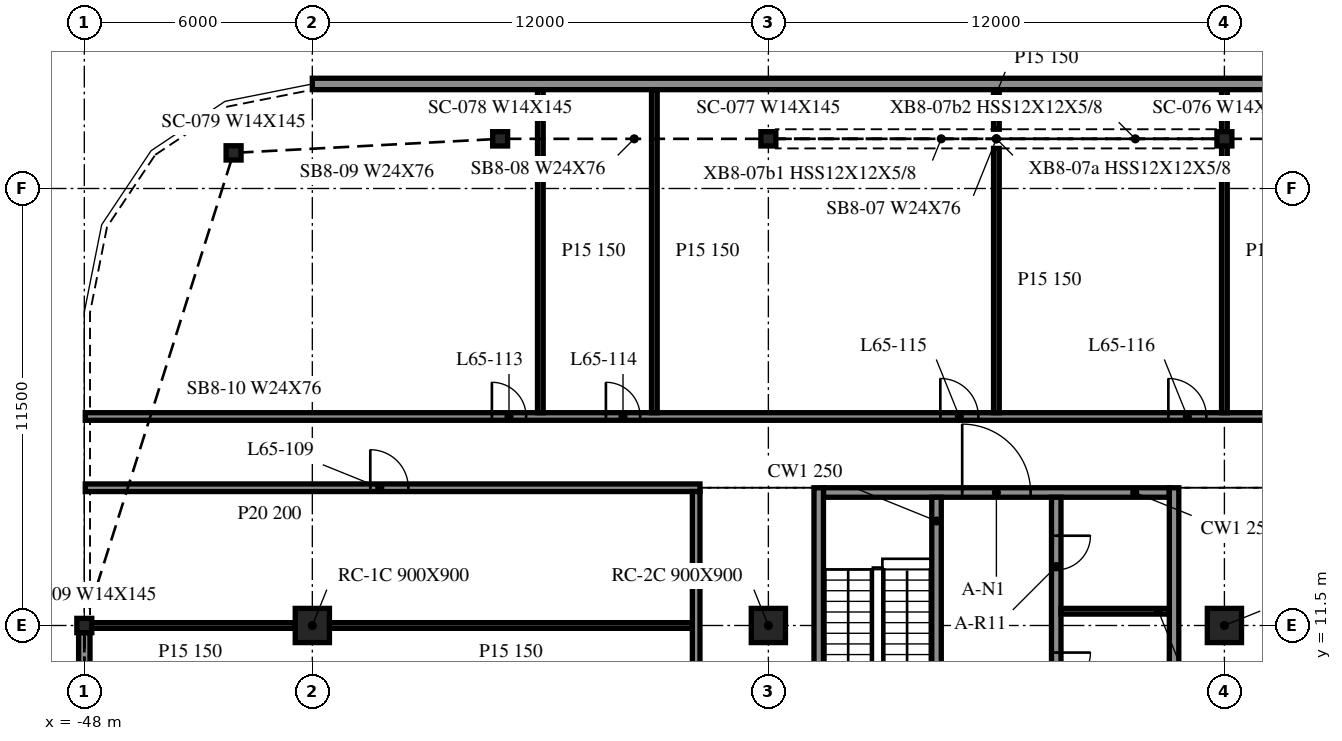
"""IFC4 building model, lengths in metres.
Left out: names, types, materials, properties, quantities, classifications, styles, units other than length and angle.
Written with IfcOpenShell. Run it as: python <this file> out.ifc"""

import sys

from ifc_helpers import new_model, si_unit, direction, frame, frame_2d, origin, origin_2d, place, context, subcontext, project, spatial, rectangle, i_section, extrude, element, fill, save


model = new_model("IFC4")
c1 = context("Model", 3, precision=1e-05, world=origin(), true_north=direction((0.0, 1.0)))
c2 = subcontext(c1, "Body", "Model", "MODEL_VIEW")
j1 = project(units=[si_unit("LENGTHUNIT", "METRE"), si_unit("PLANEANGLEUNIT", "RADIAN")], contexts=[c1])
p1 = place(None, origin())
s1 = spatial("IfcSite", under=j1, at=p1, CompositionType="ELEMENT")
p2 = place(p1, origin())
s2 = spatial("IfcBuilding", under=s1, at=p2, CompositionType="ELEMENT")
p3 = place(p2, frame((0.0, 0.0, 267.1)))
s3 = spatial("IfcBuildingStorey", under=s2, at=p3, CompositionType="ELEMENT", Elevation=267.1)
for number, where, z_axis, x_axis in (
    (1, (-42.0, 11.5, -0.34), (0.0, 0.0, 1.0), (1.0, 0.0, 0.0)),
    (2, (-30.0, 11.5, -0.34), (0.0, 0.0, 1.0), (1.0, 0.0, 0.0)),
    (3, (-18.0, 11.5, -0.34), (0.0, 0.0, 1.0), (1.0, 0.0, 0.0)),
):
    element("IfcColumn", number, at=place(p3, frame(where, z_axis=z_axis, x_axis=x_axis)), inside=s3, PredefinedType="COLUMN", context=c2, shape_type="SweptSolid", body=[
        extrude(rectangle(XDim=0.9, YDim=0.9, at=origin_2d()), origin(), (0.0, 0.0, 1.0), 3.8),
    ])
for number, where, z_axis, x_axis in (
    (4, (-18.0, 24.307, -0.34), (0.0, 0.0, 1.0), (1.0, 0.0, 0.0)),
    (5, (-30.0, 24.307, -0.34), (0.0, 0.0, 1.0), (1.0, 0.0, 0.0)),
    (6, (-37.058, 24.307, -0.34), (0.0, 0.0, 1.0), (1.0, 0.0, 0.0)),
    (7, (-44.072, 23.937, -0.34), (0.0, 0.0, 1.0), (1.0, 0.0, 0.0)),
    (8, (-48.0, 11.5, -0.34), (0.0, 0.0, 1.0), (1.0, 0.0, 0.0)),
):
    element("IfcColumn", number, at=place(p3, frame(where, z_axis=z_axis, x_axis=x_axis)), inside=s3, PredefinedType="COLUMN", context=c2, shape_type="SweptSolid", body=[
        extrude(i_section(OverallWidth=0.394, OverallDepth=0.376, WebThickness=0.017, FlangeThickness=0.028, at=origin_2d()), origin(), (0.0, 0.0, 1.0), 3.8),
    ])
p4 = place(p3, frame((42.0, 25.751, 0.0), z_axis=(0.0, 0.0, 1.0), x_axis=(-1.0, 0.0, 0.0)))
e9 = element("IfcWall", 9, at=p4, inside=s3, PredefinedType="NOTDEFINED", context=c2, shape_type="SweptSolid", body=[
    extrude(rectangle(XDim=84.0, YDim=0.3, at=frame_2d((42.0, 0.0))), origin(), (0.0, 0.0, 1.0), 2.853),
])
p5 = place(p3, frame((-48.0, 11.312, 0.0), z_axis=(0.0, 0.0, 1.0), x_axis=(0.0, -1.0, 0.0)))
e10 = element("IfcWall", 10, at=p5, inside=s3, PredefinedType="NOTDEFINED", context=c2, shape_type="SweptSolid", body=[
    extrude(rectangle(XDim=11.124, YDim=0.3, at=frame_2d((5.562, 0.0))), origin(), (0.0, 0.0, 1.0), 2.853),
])
for number, where, z_axis, x_axis in (
    (11, (-28.675, 15.125, 0.0), (0.0, 0.0, 1.0), (0.0, -1.0, 0.0)),
    (12, (-19.325, -9.125, 0.0), (0.0, 0.0, 1.0), (0.0, 1.0, 0.0)),
):
    element("IfcWall", number, at=place(p3, frame(where, z_axis=z_axis, x_axis=x_axis)), inside=s3, PredefinedType="SOLIDWALL", context=c2, shape_type="SweptSolid", body=[
        extrude(rectangle(XDim=24.25, YDim=0.25, at=frame_2d((12.125, 0.0))), origin(), (0.0, 0.0, 1.0), 3.46),
    ])
p6 = place(p3, frame((-28.55, 15.0, 0.0), z_axis=(0.0, 0.0, 1.0), x_axis=(1.0, 0.0, 0.0)))
e13 = element("IfcWall", 13, at=p6, inside=s3, PredefinedType="SOLIDWALL", context=c2, shape_type="SweptSolid", body=[
    extrude(rectangle(XDim=9.1, YDim=0.25, at=frame_2d((4.55, 0.0))), origin(), (0.0, 0.0, 1.0), 3.46),
])
p7 = place(p6, frame((3.65, 0.0, 0.0)))
e14 = element("IfcOpeningElement", 14, at=p7, cuts=e13, PredefinedType="OPENING", context=c2, shape_type="SweptSolid", body=[
    extrude(rectangle(XDim=1.8, YDim=2.1, at=frame_2d((0.9, 1.05))), frame((0.0, 0.135, 0.0), z_axis=(0.0, -1.0, 0.0), x_axis=(1.0, 0.0, 0.0)), (0.0, 0.0, 1.0), 0.27),
])
p8 = place(p3, frame((-25.575, 14.875, 0.0), z_axis=(0.0, 0.0, 1.0), x_axis=(0.0, -1.0, 0.0)))
e15 = element("IfcWall", 15, at=p8, inside=s3, PredefinedType="SOLIDWALL", context=c2, shape_type="SweptSolid", body=[
    extrude(rectangle(XDim=6.25, YDim=0.25, at=frame_2d((3.125, 0.0))), origin(), (0.0, 0.0, 1.0), 3.46),
])
p9 = place(p8, frame((4.85, 0.0, 0.0)))
e16 = element("IfcOpeningElement", 16, at=p9, cuts=e15, PredefinedType="OPENING", context=c2, shape_type="SweptSolid", body=[
    extrude(rectangle(XDim=1.0, YDim=2.1, at=frame_2d((0.5, 1.05))), frame((0.0, 0.135, 0.0), z_axis=(0.0, -1.0, 0.0), x_axis=(1.0, 0.0, 0.0)), (0.0, 0.0, 1.0), 0.27),
])
p10 = place(p3, frame((-22.425, 14.875, 0.0), z_axis=(0.0, 0.0, 1.0), x_axis=(0.0, -1.0, 0.0)))
e17 = element("IfcWall", 17, at=p10, inside=s3, PredefinedType="SOLIDWALL", context=c2, shape_type="SweptSolid", body=[
    extrude(rectangle(XDim=23.75, YDim=0.25, at=frame_2d((11.875, 0.0))), origin(), (0.0, 0.0, 1.0), 3.46),
])
p11 = place(p10, frame((13.075, 0.0, 0.0)))
e18 = element("IfcOpeningElement", 18, at=p11, cuts=e17, PredefinedType="OPENING", context=c2, shape_type="SweptSolid", body=[
    extrude(rectangle(XDim=0.9, YDim=2.1, at=frame_2d((0.45, 1.05))), frame((0.0, 0.135, 0.0), z_axis=(0.0, -1.0, 0.0), x_axis=(1.0, 0.0, 0.0)), (0.0, 0.0, 1.0), 0.27),
])
p12 = place(p10, frame((7.625, 0.0, 0.0)))
e19 = element("IfcOpeningElement", 19, at=p12, cuts=e17, PredefinedType="OPENING", context=c2, shape_type="SweptSolid", body=[
    extrude(rectangle(XDim=0.9, YDim=2.1, at=frame_2d((0.45, 1.05))), frame((0.0, 0.135, 0.0), z_axis=(0.0, -1.0, 0.0), x_axis=(1.0, 0.0, 0.0)), (0.0, 0.0, 1.0), 0.27),
])
p13 = place(p10, frame((21.597, 0.0, 0.0)))
e20 = element("IfcOpeningElement", 20, at=p13, cuts=e17, PredefinedType="OPENING", context=c2, shape_type="SweptSolid", body=[
    extrude(rectangle(XDim=0.9, YDim=2.1, at=frame_2d((0.45, 1.05))), frame((0.0, 0.135, 0.0), z_axis=(0.0, -1.0, 0.0), x_axis=(1.0, 0.0, 0.0)), (0.0, 0.0, 1.0), 0.27),
])
p14 = place(p10, frame((18.522, 0.0, 0.0)))
e21 = element("IfcOpeningElement", 21, at=p14, cuts=e17, PredefinedType="OPENING", context=c2, shape_type="SweptSolid", body=[
    extrude(rectangle(XDim=0.9, YDim=2.1, at=frame_2d((0.45, 1.05))), frame((0.0, 0.135, 0.0), z_axis=(0.0, -1.0, 0.0), x_axis=(1.0, 0.0, 0.0)), (0.0, 0.0, 1.0), 0.27),
])
p15 = place(p10, frame((4.087, 0.0, 0.0)))
e22 = element("IfcOpeningElement", 22, at=p15, cuts=e17, PredefinedType="OPENING", context=c2, shape_type="SweptSolid", body=[
    extrude(rectangle(XDim=0.9, YDim=2.1, at=frame_2d((0.45, 1.05))), frame((0.0, 0.135, 0.0), z_axis=(0.0, -1.0, 0.0), x_axis=(1.0, 0.0, 0.0)), (0.0, 0.0, 1.0), 0.27),
])
p16 = place(p10, frame((1.012, 0.0, 0.0)))
e23 = element("IfcOpeningElement", 23, at=p16, cuts=e17, PredefinedType="OPENING", context=c2, shape_type="SweptSolid", body=[
    extrude(rectangle(XDim=0.9, YDim=2.1, at=frame_2d((0.45, 1.05))), frame((0.0, 0.135, 0.0), z_axis=(0.0, -1.0, 0.0), x_axis=(1.0, 0.0, 0.0)), (0.0, 0.0, 1.0), 0.27),
])
p17 = place(p3, frame((-22.3, 11.875, 0.0), z_axis=(0.0, 0.0, 1.0), x_axis=(1.0, 0.0, 0.0)))
e24 = element("IfcWall", 24, at=p17, inside=s3, PredefinedType="PARTITIONING", context=c2, shape_type="SweptSolid", body=[
    extrude(rectangle(XDim=2.85, YDim=0.15, at=frame_2d((1.425, 0.0))), origin(), (0.0, 0.0, 1.0), 3.46),
])
p18 = place(p3, frame((-47.975, 11.5, 0.0), z_axis=(0.0, 0.0, 1.0), x_axis=(1.0, 0.0, 0.0)))
e25 = element("IfcWall", 25, at=p18, inside=s3, PredefinedType="PARTITIONING", context=c2, shape_type="SweptSolid", body=[
    extrude(rectangle(XDim=5.525, YDim=0.15, at=frame_2d((2.763, 0.0))), origin(), (0.0, 0.0, 1.0), 3.46),
])
p19 = place(p3, frame((-41.55, 11.5, 0.0), z_axis=(0.0, 0.0, 1.0), x_axis=(1.0, 0.0, 0.0)))
e26 = element("IfcWall", 26, at=p19, inside=s3, PredefinedType="PARTITIONING", context=c2, shape_type="SweptSolid", body=[
    extrude(rectangle(XDim=9.55, YDim=0.15, at=frame_2d((4.775, 0.0))), origin(), (0.0, 0.0, 1.0), 3.46),
])
p20 = place(p3, frame((-47.975, 15.125, 0.0), z_axis=(0.0, 0.0, 1.0), x_axis=(1.0, 0.0, 0.0)))
e27 = element("IfcWall", 27, at=p20, inside=s3, PredefinedType="PARTITIONING", context=c2, shape_type="SweptSolid", body=[
    extrude(rectangle(XDim=16.175, YDim=0.2, at=frame_2d((8.087, 0.0))), origin(), (0.0, 0.0, 1.0), 3.46),
])
p21 = place(p20, frame((7.5, 0.0, 0.0)))
e28 = element("IfcOpeningElement", 28, at=p21, cuts=e27, PredefinedType="OPENING", context=c2, shape_type="SweptSolid", body=[
    extrude(rectangle(XDim=1.0, YDim=2.1, at=frame_2d((0.5, 1.05))), frame((0.0, 0.11, 0.0), z_axis=(0.0, -1.0, 0.0), x_axis=(1.0, 0.0, 0.0)), (0.0, 0.0, 1.0), 0.22),
])
p22 = place(p3, frame((-47.975, 17.0, 0.0), z_axis=(0.0, 0.0, 1.0), x_axis=(1.0, 0.0, 0.0)))
e29 = element("IfcWall", 29, at=p22, inside=s3, PredefinedType="PARTITIONING", context=c2, shape_type="SweptSolid", body=[
    extrude(rectangle(XDim=95.95, YDim=0.2, at=frame_2d((47.975, 0.0))), origin(), (0.0, 0.0, 1.0), 3.46),
])
p23 = place(p22, frame((10.7, 0.0, 0.0)))
e30 = element("IfcOpeningElement", 30, at=p23, cuts=e29, PredefinedType="OPENING", context=c2, shape_type="SweptSolid", body=[
    extrude(rectangle(XDim=0.9, YDim=2.1, at=frame_2d((0.45, 1.05))), frame((0.0, 0.11, 0.0), z_axis=(0.0, -1.0, 0.0), x_axis=(1.0, 0.0, 0.0)), (0.0, 0.0, 1.0), 0.22),
])
p24 = place(p22, frame((13.7, 0.0, 0.0)))
e31 = element("IfcOpeningElement", 31, at=p24, cuts=e29, PredefinedType="OPENING", context=c2, shape_type="SweptSolid", body=[
    extrude(rectangle(XDim=0.9, YDim=2.1, at=frame_2d((0.45, 1.05))), frame((0.0, 0.11, 0.0), z_axis=(0.0, -1.0, 0.0), x_axis=(1.0, 0.0, 0.0)), (0.0, 0.0, 1.0), 0.22),
])
p25 = place(p22, frame((22.5, 0.0, 0.0)))
e32 = element("IfcOpeningElement", 32, at=p25, cuts=e29, PredefinedType="OPENING", context=c2, shape_type="SweptSolid", body=[
    extrude(rectangle(XDim=1.0, YDim=2.1, at=frame_2d((0.5, 1.05))), frame((0.0, 0.11, 0.0), z_axis=(0.0, -1.0, 0.0), x_axis=(1.0, 0.0, 0.0)), (0.0, 0.0, 1.0), 0.22),
])
p26 = place(p22, frame((28.5, 0.0, 0.0)))
e33 = element("IfcOpeningElement", 33, at=p26, cuts=e29, PredefinedType="OPENING", context=c2, shape_type="SweptSolid", body=[
    extrude(rectangle(XDim=1.0, YDim=2.1, at=frame_2d((0.5, 1.05))), frame((0.0, 0.11, 0.0), z_axis=(0.0, -1.0, 0.0), x_axis=(1.0, 0.0, 0.0)), (0.0, 0.0, 1.0), 0.22),
])
p27 = place(p22, frame((40.7, 0.0, 0.0)))
e34 = element("IfcOpeningElement", 34, at=p27, cuts=e29, PredefinedType="OPENING", context=c2, shape_type="SweptSolid", body=[
    extrude(rectangle(XDim=0.9, YDim=2.1, at=frame_2d((0.45, 1.05))), frame((0.0, 0.11, 0.0), z_axis=(0.0, -1.0, 0.0), x_axis=(1.0, 0.0, 0.0)), (0.0, 0.0, 1.0), 0.22),
])
p28 = place(p22, frame((43.5, 0.0, 0.0)))
e35 = element("IfcOpeningElement", 35, at=p28, cuts=e29, PredefinedType="OPENING", context=c2, shape_type="SweptSolid", body=[
    extrude(rectangle(XDim=1.0, YDim=2.1, at=frame_2d((0.5, 1.05))), frame((0.0, 0.11, 0.0), z_axis=(0.0, -1.0, 0.0), x_axis=(1.0, 0.0, 0.0)), (0.0, 0.0, 1.0), 0.22),
])
p29 = place(p22, frame((47.3, 0.0, 0.0)))
e36 = element("IfcOpeningElement", 36, at=p29, cuts=e29, PredefinedType="OPENING", context=c2, shape_type="SweptSolid", body=[
    extrude(rectangle(XDim=0.9, YDim=2.1, at=frame_2d((0.45, 1.05))), frame((0.0, 0.11, 0.0), z_axis=(0.0, -1.0, 0.0), x_axis=(1.0, 0.0, 0.0)), (0.0, 0.0, 1.0), 0.22),
])
p30 = place(p22, frame((54.1, 0.0, 0.0)))
e37 = element("IfcOpeningElement", 37, at=p30, cuts=e29, PredefinedType="OPENING", context=c2, shape_type="SweptSolid", body=[
    extrude(rectangle(XDim=0.9, YDim=2.1, at=frame_2d((0.45, 1.05))), frame((0.0, 0.11, 0.0), z_axis=(0.0, -1.0, 0.0), x_axis=(1.0, 0.0, 0.0)), (0.0, 0.0, 1.0), 0.22),
])
p31 = place(p22, frame((60.1, 0.0, 0.0)))
e38 = element("IfcOpeningElement", 38, at=p31, cuts=e29, PredefinedType="OPENING", context=c2, shape_type="SweptSolid", body=[
    extrude(rectangle(XDim=1.0, YDim=2.1, at=frame_2d((0.5, 1.05))), frame((0.0, 0.11, 0.0), z_axis=(0.0, -1.0, 0.0), x_axis=(1.0, 0.0, 0.0)), (0.0, 0.0, 1.0), 0.22),
])
p32 = place(p22, frame((72.1, 0.0, 0.0)))
e39 = element("IfcOpeningElement", 39, at=p32, cuts=e29, PredefinedType="OPENING", context=c2, shape_type="SweptSolid", body=[
    extrude(rectangle(XDim=1.0, YDim=2.1, at=frame_2d((0.5, 1.05))), frame((0.0, 0.11, 0.0), z_axis=(0.0, -1.0, 0.0), x_axis=(1.0, 0.0, 0.0)), (0.0, 0.0, 1.0), 0.22),
])
p33 = place(p22, frame((75.1, 0.0, 0.0)))
e40 = element("IfcOpeningElement", 40, at=p33, cuts=e29, PredefinedType="OPENING", context=c2, shape_type="SweptSolid", body=[
    extrude(rectangle(XDim=0.9, YDim=2.1, at=frame_2d((0.45, 1.05))), frame((0.0, 0.11, 0.0), z_axis=(0.0, -1.0, 0.0), x_axis=(1.0, 0.0, 0.0)), (0.0, 0.0, 1.0), 0.22),
])
p34 = place(p22, frame((84.1, 0.0, 0.0)))
e41 = element("IfcOpeningElement", 41, at=p34, cuts=e29, PredefinedType="OPENING", context=c2, shape_type="SweptSolid", body=[
    extrude(rectangle(XDim=1.0, YDim=2.1, at=frame_2d((0.5, 1.05))), frame((0.0, 0.11, 0.0), z_axis=(0.0, -1.0, 0.0), x_axis=(1.0, 0.0, 0.0)), (0.0, 0.0, 1.0), 0.22),
])
p35 = place(p22, frame((90.1, 0.0, 0.0)))
e42 = element("IfcOpeningElement", 42, at=p35, cuts=e29, PredefinedType="OPENING", context=c2, shape_type="SweptSolid", body=[
    extrude(rectangle(XDim=0.9, YDim=2.1, at=frame_2d((0.45, 1.05))), frame((0.0, 0.11, 0.0), z_axis=(0.0, -1.0, 0.0), x_axis=(1.0, 0.0, 0.0)), (0.0, 0.0, 1.0), 0.22),
])
for number, where, z_axis, x_axis in (
    (43, (-36.0, 17.1, 0.0), (0.0, 0.0, 1.0), (0.0, 1.0, 0.0)),
    (44, (-33.0, 17.1, 0.0), (0.0, 0.0, 1.0), (0.0, 1.0, 0.0)),
):
    element("IfcWall", number, at=place(p3, frame(where, z_axis=z_axis, x_axis=x_axis)), inside=s3, PredefinedType="PARTITIONING", context=c2, shape_type="SweptSolid", body=[
        extrude(rectangle(XDim=8.501, YDim=0.15, at=frame_2d((4.25, 0.0))), origin(), (0.0, 0.0, 1.0), 3.46),
    ])
p36 = place(p3, frame((-31.9, -9.025, 0.0), z_axis=(0.0, 0.0, 1.0), x_axis=(0.0, 1.0, 0.0)))
e45 = element("IfcWall", 45, at=p36, inside=s3, PredefinedType="PARTITIONING", context=c2, shape_type="SweptSolid", body=[
    extrude(rectangle(XDim=24.05, YDim=0.2, at=frame_2d((12.025, 0.0))), origin(), (0.0, 0.0, 1.0), 3.46),
])
p37 = place(p36, frame((12.3, 0.0, 0.0)))
e46 = element("IfcOpeningElement", 46, at=p37, cuts=e45, PredefinedType="OPENING", context=c2, shape_type="SweptSolid", body=[
    extrude(rectangle(XDim=1.0, YDim=2.1, at=frame_2d((0.5, 1.05))), frame((0.0, 0.11, 0.0), z_axis=(0.0, -1.0, 0.0), x_axis=(1.0, 0.0, 0.0)), (0.0, 0.0, 1.0), 0.22),
])
p38 = place(p3, frame((-24.0, 17.1, 0.0), z_axis=(0.0, 0.0, 1.0), x_axis=(0.0, 1.0, 0.0)))
e47 = element("IfcWall", 47, at=p38, inside=s3, PredefinedType="PARTITIONING", context=c2, shape_type="SweptSolid", body=[
    extrude(rectangle(XDim=6.955, YDim=0.15, at=frame_2d((3.477, 0.0))), origin(), (0.0, 0.0, 1.0), 3.46),
])
p39 = place(p3, frame((-24.0, 24.559, 0.0), z_axis=(0.0, 0.0, 1.0), x_axis=(0.0, 1.0, 0.0)))
e48 = element("IfcWall", 48, at=p39, inside=s3, PredefinedType="PARTITIONING", context=c2, shape_type="SweptSolid", body=[
    extrude(rectangle(XDim=1.042, YDim=0.15, at=frame_2d((0.521, 0.0))), origin(), (0.0, 0.0, 1.0), 3.46),
])
p40 = place(p3, frame((-18.0, 17.1, 0.0), z_axis=(0.0, 0.0, 1.0), x_axis=(0.0, 1.0, 0.0)))
e49 = element("IfcWall", 49, at=p40, inside=s3, PredefinedType="PARTITIONING", context=c2, shape_type="SweptSolid", body=[
    extrude(rectangle(XDim=8.501, YDim=0.15, at=frame_2d((4.25, 0.0))), origin(), (0.0, 0.0, 1.0), 3.46),
])
p41 = place(p7, origin())
e50 = element("IfcDoor", 50, at=p41, inside=s3, OperationType="DOUBLE_DOOR_SINGLE_SWING", PredefinedType="DOOR", context=c2, shape_type="SweptSolid", body=[
    extrude(rectangle(XDim=1.8, YDim=2.1, at=frame_2d((0.9, 1.05))), frame((0.0, 0.025, 0.0), z_axis=(0.0, -1.0, 0.0), x_axis=(1.0, 0.0, 0.0)), (0.0, 0.0, 1.0), 0.05),
])
fill(e14, e50)
p42 = place(p15, origin())
e51 = element("IfcDoor", 51, at=p42, inside=s3, OperationType="SINGLE_SWING_RIGHT", PredefinedType="DOOR", context=c2, shape_type="SweptSolid", body=[
    extrude(rectangle(XDim=0.9, YDim=2.1, at=frame_2d((0.45, 1.05))), frame((0.0, 0.025, 0.0), z_axis=(0.0, -1.0, 0.0), x_axis=(1.0, 0.0, 0.0)), (0.0, 0.0, 1.0), 0.05),
])
fill(e22, e51)
p43 = place(p16, origin())
e52 = element("IfcDoor", 52, at=p43, inside=s3, OperationType="SINGLE_SWING_LEFT", PredefinedType="DOOR", context=c2, shape_type="SweptSolid", body=[
    extrude(rectangle(XDim=0.9, YDim=2.1, at=frame_2d((0.45, 1.05))), frame((0.0, 0.025, 0.0), z_axis=(0.0, -1.0, 0.0), x_axis=(1.0, 0.0, 0.0)), (0.0, 0.0, 1.0), 0.05),
])
fill(e23, e52)
p44 = place(p21, origin())
e53 = element("IfcDoor", 53, at=p44, inside=s3, OperationType="SINGLE_SWING_RIGHT", PredefinedType="DOOR", context=c2, shape_type="SweptSolid", body=[
    extrude(rectangle(XDim=1.0, YDim=2.1, at=frame_2d((0.5, 1.05))), frame((0.0, 0.025, 0.0), z_axis=(0.0, -1.0, 0.0), x_axis=(1.0, 0.0, 0.0)), (0.0, 0.0, 1.0), 0.05),
])
fill(e28, e53)
p45 = place(p23, origin())
e54 = element("IfcDoor", 54, at=p45, inside=s3, OperationType="SINGLE_SWING_LEFT", PredefinedType="DOOR", context=c2, shape_type="SweptSolid", body=[
    extrude(rectangle(XDim=0.9, YDim=2.1, at=frame_2d((0.45, 1.05))), frame((0.0, 0.025, 0.0), z_axis=(0.0, -1.0, 0.0), x_axis=(1.0, 0.0, 0.0)), (0.0, 0.0, 1.0), 0.05),
])
fill(e30, e54)
p46 = place(p24, origin())
e55 = element("IfcDoor", 55, at=p46, inside=s3, OperationType="SINGLE_SWING_LEFT", PredefinedType="DOOR", context=c2, shape_type="SweptSolid", body=[
    extrude(rectangle(XDim=0.9, YDim=2.1, at=frame_2d((0.45, 1.05))), frame((0.0, 0.025, 0.0), z_axis=(0.0, -1.0, 0.0), x_axis=(1.0, 0.0, 0.0)), (0.0, 0.0, 1.0), 0.05),
])
fill(e31, e55)
p47 = place(p25, origin())
e56 = element("IfcDoor", 56, at=p47, inside=s3, OperationType="SINGLE_SWING_LEFT", PredefinedType="DOOR", context=c2, shape_type="SweptSolid", body=[
    extrude(rectangle(XDim=1.0, YDim=2.1, at=frame_2d((0.5, 1.05))), frame((0.0, 0.025, 0.0), z_axis=(0.0, -1.0, 0.0), x_axis=(1.0, 0.0, 0.0)), (0.0, 0.0, 1.0), 0.05),
])
fill(e32, e56)
p48 = place(p26, origin())
e57 = element("IfcDoor", 57, at=p48, inside=s3, OperationType="SINGLE_SWING_LEFT", PredefinedType="DOOR", context=c2, shape_type="SweptSolid", body=[
    extrude(rectangle(XDim=1.0, YDim=2.1, at=frame_2d((0.5, 1.05))), frame((0.0, 0.025, 0.0), z_axis=(0.0, -1.0, 0.0), x_axis=(1.0, 0.0, 0.0)), (0.0, 0.0, 1.0), 0.05),
])
fill(e33, e57)
save(model, sys.argv[1])
